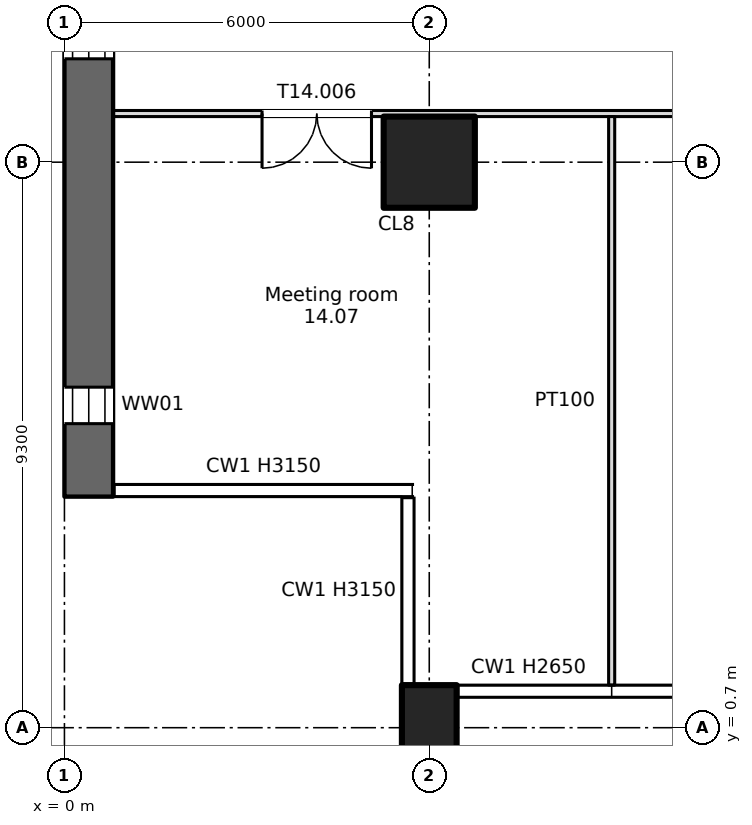
"""IFC4 building model, lengths in metres.
Left out: names, types, materials, properties, quantities, classifications, styles, units other than length and angle.
Written with IfcOpenShell. Run it as: python <this file> out.ifc"""

import sys

from ifc_helpers import new_model, si_unit, direction, frame, frame_2d, origin, origin_2d, place, context, subcontext, project, spatial, rectangle, extrude, element, fill, save


model = new_model("IFC4")
c1 = context("Model", 3, precision=1e-05, world=origin(), true_north=direction((0.0, 1.0)))
c2 = subcontext(c1, "Body", "Model", "MODEL_VIEW")
j1 = project(units=[si_unit("LENGTHUNIT", "METRE"), si_unit("PLANEANGLEUNIT", "RADIAN")], contexts=[c1])
p1 = place(None, origin())
s1 = spatial("IfcSite", under=j1, at=p1, CompositionType="ELEMENT")
p2 = place(p1, origin())
s2 = spatial("IfcBuilding", under=s1, at=p2, CompositionType="ELEMENT")
p3 = place(p2, frame((0.0, 0.0, 86.25)))
s3 = spatial("IfcBuildingStorey", under=s2, at=p3, CompositionType="ELEMENT", Elevation=86.25)
p4 = place(p3, frame((6.0, 0.7, -0.4), z_axis=(0.0, 0.0, 1.0), x_axis=(1.0, 0.0, 0.0)))
e1 = element("IfcColumn", 1, at=p4, inside=s3, PredefinedType="COLUMN", context=c2, shape_type="SweptSolid", body=[
    extrude(rectangle(XDim=0.9, YDim=1.4, at=origin_2d()), origin(), (0.0, 0.0, 1.0), 3.55),
])
p5 = place(p3, frame((6.0, 10.0, 0.0), z_axis=(0.0, 0.0, 1.0), x_axis=(1.0, 0.0, 0.0)))
e2 = element("IfcColumn", 2, at=p5, inside=s3, PredefinedType="COLUMN", context=c2, shape_type="SweptSolid", body=[
    extrude(rectangle(XDim=1.5, YDim=1.5, at=origin_2d()), origin(), (0.0, 0.0, 1.0), 3.15),
])
p6 = place(p3, frame((0.4, 4.5, 0.0), z_axis=(0.0, 0.0, 1.0), x_axis=(0.0, 1.0, 0.0)))
e3 = element("IfcWall", 3, at=p6, inside=s3, PredefinedType="SHEAR", context=c2, shape_type="SweptSolid", body=[
    extrude(rectangle(XDim=37.0, YDim=0.8, at=frame_2d((18.5, 0.0))), origin(), (0.0, 0.0, 1.0), 3.15),
])
p7 = place(p6, frame((1.2, 0.0, 0.6)))
e4 = element("IfcOpeningElement", 4, at=p7, cuts=e3, PredefinedType="OPENING", context=c2, shape_type="SweptSolid", body=[
    extrude(rectangle(XDim=0.6, YDim=2.4, at=frame_2d((0.3, 1.2))), frame((0.0, 0.41, 0.0), z_axis=(0.0, -1.0, 0.0), x_axis=(1.0, 0.0, 0.0)), (0.0, 0.0, 1.0), 0.82),
])
p8 = place(p6, frame((7.2, 0.0, 0.6)))
e5 = element("IfcOpeningElement", 5, at=p8, cuts=e3, PredefinedType="OPENING", context=c2, shape_type="SweptSolid", body=[
    extrude(rectangle(XDim=0.6, YDim=2.4, at=frame_2d((0.3, 1.2))), frame((0.0, 0.41, 0.0), z_axis=(0.0, -1.0, 0.0), x_axis=(1.0, 0.0, 0.0)), (0.0, 0.0, 1.0), 0.82),
])
p9 = place(p6, frame((13.2, 0.0, 0.6)))
e6 = element("IfcOpeningElement", 6, at=p9, cuts=e3, PredefinedType="OPENING", context=c2, shape_type="SweptSolid", body=[
    extrude(rectangle(XDim=0.6, YDim=2.4, at=frame_2d((0.3, 1.2))), frame((0.0, 0.41, 0.0), z_axis=(0.0, -1.0, 0.0), x_axis=(1.0, 0.0, 0.0)), (0.0, 0.0, 1.0), 0.82),
])
p10 = place(p6, frame((19.2, 0.0, 0.6)))
e7 = element("IfcOpeningElement", 7, at=p10, cuts=e3, PredefinedType="OPENING", context=c2, shape_type="SweptSolid", body=[
    extrude(rectangle(XDim=0.6, YDim=2.4, at=frame_2d((0.3, 1.2))), frame((0.0, 0.41, 0.0), z_axis=(0.0, -1.0, 0.0), x_axis=(1.0, 0.0, 0.0)), (0.0, 0.0, 1.0), 0.82),
])
p11 = place(p3, frame((0.8, 10.8, 0.0), z_axis=(0.0, 0.0, 1.0), x_axis=(1.0, 0.0, 0.0)))
e8 = element("IfcWall", 8, at=p11, inside=s3, PredefinedType="PARTITIONING", context=c2, shape_type="SweptSolid", body=[
    extrude(rectangle(XDim=76.4, YDim=0.1, at=frame_2d((38.2, 0.0))), origin(), (0.0, 0.0, 1.0), 3.15),
])
p12 = place(p11, frame((14.55, 0.0, 0.0)))
e9 = element("IfcOpeningElement", 9, at=p12, cuts=e8, PredefinedType="OPENING", context=c2, shape_type="SweptSolid", body=[
    extrude(rectangle(XDim=1.8, YDim=2.1, at=frame_2d((0.9, 1.05))), frame((0.0, 0.06, 0.0), z_axis=(0.0, -1.0, 0.0), x_axis=(1.0, 0.0, 0.0)), (0.0, 0.0, 1.0), 0.12),
])
p13 = place(p11, frame((26.55, 0.0, 0.0)))
e10 = element("IfcOpeningElement", 10, at=p13, cuts=e8, PredefinedType="OPENING", context=c2, shape_type="SweptSolid", body=[
    extrude(rectangle(XDim=1.8, YDim=2.1, at=frame_2d((0.9, 1.05))), frame((0.0, 0.06, 0.0), z_axis=(0.0, -1.0, 0.0), x_axis=(1.0, 0.0, 0.0)), (0.0, 0.0, 1.0), 0.12),
])
p14 = place(p11, frame((38.55, 0.0, 0.0)))
e11 = element("IfcOpeningElement", 11, at=p14, cuts=e8, PredefinedType="OPENING", context=c2, shape_type="SweptSolid", body=[
    extrude(rectangle(XDim=1.8, YDim=2.1, at=frame_2d((0.9, 1.05))), frame((0.0, 0.06, 0.0), z_axis=(0.0, -1.0, 0.0), x_axis=(1.0, 0.0, 0.0)), (0.0, 0.0, 1.0), 0.12),
])
p15 = place(p11, frame((54.05, 0.0, 0.0)))
e12 = element("IfcOpeningElement", 12, at=p15, cuts=e8, PredefinedType="OPENING", context=c2, shape_type="SweptSolid", body=[
    extrude(rectangle(XDim=1.8, YDim=2.1, at=frame_2d((0.9, 1.05))), frame((0.0, 0.06, 0.0), z_axis=(0.0, -1.0, 0.0), x_axis=(1.0, 0.0, 0.0)), (0.0, 0.0, 1.0), 0.12),
])
p16 = place(p11, frame((68.4, 0.0, 0.0)))
e13 = element("IfcOpeningElement", 13, at=p16, cuts=e8, PredefinedType="OPENING", context=c2, shape_type="SweptSolid", body=[
    extrude(rectangle(XDim=1.8, YDim=2.1, at=frame_2d((0.9, 1.05))), frame((0.0, 0.06, 0.0), z_axis=(0.0, -1.0, 0.0), x_axis=(1.0, 0.0, 0.0)), (0.0, 0.0, 1.0), 0.12),
])
p17 = place(p11, frame((2.45, 0.0, 0.0)))
e14 = element("IfcOpeningElement", 14, at=p17, cuts=e8, PredefinedType="OPENING", context=c2, shape_type="SweptSolid", body=[
    extrude(rectangle(XDim=1.8, YDim=2.1, at=frame_2d((0.9, 1.05))), frame((0.0, 0.06, 0.0), z_axis=(0.0, -1.0, 0.0), x_axis=(1.0, 0.0, 0.0)), (0.0, 0.0, 1.0), 0.12),
])
p18 = place(p3, frame((9.0, 1.4, 0.0), z_axis=(0.0, 0.0, 1.0), x_axis=(0.0, 1.0, 0.0)))
e15 = element("IfcWall", 15, at=p18, inside=s3, PredefinedType="PARTITIONING", context=c2, shape_type="SweptSolid", body=[
    extrude(rectangle(XDim=9.35, YDim=0.1, at=frame_2d((4.675, 0.0))), origin(), (0.0, 0.0, 1.0), 3.15),
])
p19 = place(p7, origin())
e16 = element("IfcWindow", 16, at=p19, inside=s3, PartitioningType="SINGLE_PANEL", PredefinedType="WINDOW", context=c2, shape_type="SweptSolid", body=[
    extrude(rectangle(XDim=0.6, YDim=2.4, at=frame_2d((0.3, 1.2))), frame((0.0, 0.03, 0.0), z_axis=(0.0, -1.0, 0.0), x_axis=(1.0, 0.0, 0.0)), (0.0, 0.0, 1.0), 0.06),
])
fill(e4, e16)
p20 = place(p8, origin())
e17 = element("IfcWindow", 17, at=p20, inside=s3, PartitioningType="SINGLE_PANEL", PredefinedType="WINDOW", context=c2, shape_type="SweptSolid", body=[
    extrude(rectangle(XDim=0.6, YDim=2.4, at=frame_2d((0.3, 1.2))), frame((0.0, 0.03, 0.0), z_axis=(0.0, -1.0, 0.0), x_axis=(1.0, 0.0, 0.0)), (0.0, 0.0, 1.0), 0.06),
])
fill(e5, e17)
p21 = place(p17, origin())
e18 = element("IfcDoor", 18, at=p21, inside=s3, OperationType="DOUBLE_DOOR_SINGLE_SWING", PredefinedType="DOOR", context=c2, shape_type="SweptSolid", body=[
    extrude(rectangle(XDim=1.8, YDim=2.1, at=frame_2d((0.9, 1.05))), frame((0.0, 0.025, 0.0), z_axis=(0.0, -1.0, 0.0), x_axis=(1.0, 0.0, 0.0)), (0.0, 0.0, 1.0), 0.05),
])
fill(e14, e18)
save(model, sys.argv[1])
